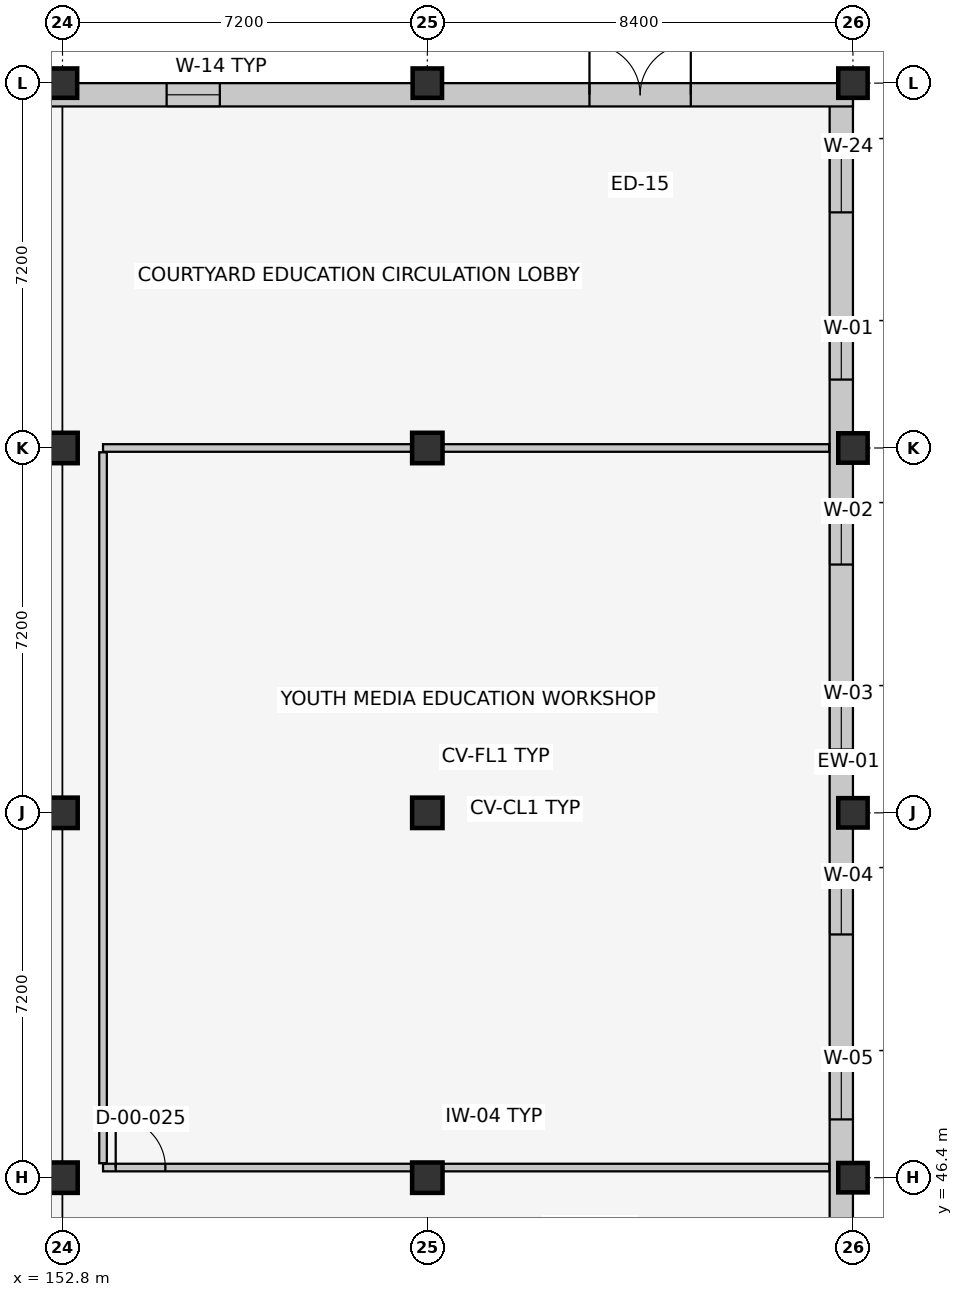
"""IFC4 building model, lengths in metres.
Left out: names, types, materials, properties, quantities, classifications, styles, units other than length and angle.
Written with IfcOpenShell. Run it as: python <this file> out.ifc"""

import sys

from ifc_helpers import new_model, si_unit, direction, frame, frame_2d, origin, origin_2d, place, context, subcontext, project, spatial, rectangle, extrude, element, fill, save


model = new_model("IFC4")
c1 = context("Model", 3, precision=1e-05, world=origin(), true_north=direction((0.0, 1.0)))
c2 = subcontext(c1, "Body", "Model", "MODEL_VIEW")
j1 = project(units=[si_unit("LENGTHUNIT", "METRE"), si_unit("PLANEANGLEUNIT", "RADIAN")], contexts=[c1])
p1 = place(None, origin())
s1 = spatial("IfcSite", under=j1, at=p1, CompositionType="ELEMENT")
p2 = place(p1, origin())
s2 = spatial("IfcBuilding", under=s1, at=p2, CompositionType="ELEMENT")
p3 = place(p2, origin())
s3 = spatial("IfcBuildingStorey", under=s2, at=p3, CompositionType="ELEMENT", Elevation=0.0)
for number, where, z_axis, x_axis in (
    (1, (152.8, 46.4, 0.0), (0.0, 0.0, 1.0), (1.0, 0.0, 0.0)),
    (2, (152.8, 53.6, 0.0), (0.0, 0.0, 1.0), (1.0, 0.0, 0.0)),
    (3, (152.8, 60.8, 0.0), (0.0, 0.0, 1.0), (1.0, 0.0, 0.0)),
):
    element("IfcColumn", number, at=place(p3, frame(where, z_axis=z_axis, x_axis=x_axis)), inside=s3, PredefinedType="COLUMN", context=c2, shape_type="SweptSolid", body=[
        extrude(rectangle(XDim=0.6, YDim=0.6, at=origin_2d()), origin(), (0.0, 0.0, 1.0), 5.4),
    ])
p4 = place(p3, frame((152.8, 68.0, 0.0), z_axis=(0.0, 0.0, 1.0), x_axis=(1.0, 0.0, 0.0)))
e4 = element("IfcColumn", 4, at=p4, inside=s3, PredefinedType="COLUMN", context=c2, shape_type="SweptSolid", body=[
    extrude(rectangle(XDim=0.58, YDim=0.58, at=origin_2d()), origin(), (0.0, 0.0, 1.0), 5.4),
])
for number, where, z_axis, x_axis in (
    (5, (160.0, 46.4, 0.0), (0.0, 0.0, 1.0), (1.0, 0.0, 0.0)),
    (6, (160.0, 53.6, 0.0), (0.0, 0.0, 1.0), (1.0, 0.0, 0.0)),
    (7, (160.0, 60.8, 0.0), (0.0, 0.0, 1.0), (1.0, 0.0, 0.0)),
):
    element("IfcColumn", number, at=place(p3, frame(where, z_axis=z_axis, x_axis=x_axis)), inside=s3, PredefinedType="COLUMN", context=c2, shape_type="SweptSolid", body=[
        extrude(rectangle(XDim=0.6, YDim=0.6, at=origin_2d()), origin(), (0.0, 0.0, 1.0), 5.4),
    ])
for number, where, z_axis, x_axis in (
    (8, (160.0, 68.0, 0.0), (0.0, 0.0, 1.0), (1.0, 0.0, 0.0)),
    (9, (168.4, 46.4, 0.0), (0.0, 0.0, 1.0), (1.0, 0.0, 0.0)),
    (10, (168.4, 53.6, 0.0), (0.0, 0.0, 1.0), (1.0, 0.0, 0.0)),
    (11, (168.4, 60.8, 0.0), (0.0, 0.0, 1.0), (1.0, 0.0, 0.0)),
    (12, (168.4, 68.0, 0.0), (0.0, 0.0, 1.0), (1.0, 0.0, 0.0)),
):
    element("IfcColumn", number, at=place(p3, frame(where, z_axis=z_axis, x_axis=x_axis)), inside=s3, PredefinedType="COLUMN", context=c2, shape_type="SweptSolid", body=[
        extrude(rectangle(XDim=0.58, YDim=0.58, at=origin_2d()), origin(), (0.0, 0.0, 1.0), 5.4),
    ])
p5 = place(p3, frame((168.17, 68.0, 0.0), z_axis=(0.0, 0.0, 1.0), x_axis=(0.0, -1.0, 0.0)))
e13 = element("IfcWall", 13, at=p5, inside=s3, PredefinedType="SOLIDWALL", context=c2, shape_type="SweptSolid", body=[
    extrude(rectangle(XDim=28.8, YDim=0.46, at=frame_2d((14.4, 0.0))), origin(), (0.0, 0.0, 1.0), 4.555),
])
p6 = place(p5, frame((1.05, 0.0, 0.9)))
e14 = element("IfcOpeningElement", 14, at=p6, cuts=e13, PredefinedType="OPENING", context=c2, shape_type="SweptSolid", body=[
    extrude(rectangle(XDim=1.5, YDim=1.75, at=frame_2d((0.75, 0.875))), frame((0.0, 0.242, 0.0), z_axis=(0.0, -1.0, 0.0), x_axis=(1.0, 0.0, 0.0)), (0.0, 0.0, 1.0), 0.484),
])
p7 = place(p5, frame((4.95, 0.0, 0.9)))
e15 = element("IfcOpeningElement", 15, at=p7, cuts=e13, PredefinedType="OPENING", context=c2, shape_type="SweptSolid", body=[
    extrude(rectangle(XDim=0.9, YDim=1.35, at=frame_2d((0.45, 0.675))), frame((0.0, 0.242, 0.0), z_axis=(0.0, -1.0, 0.0), x_axis=(1.0, 0.0, 0.0)), (0.0, 0.0, 1.0), 0.484),
])
p8 = place(p5, frame((8.5, 0.0, 0.9)))
e16 = element("IfcOpeningElement", 16, at=p8, cuts=e13, PredefinedType="OPENING", context=c2, shape_type="SweptSolid", body=[
    extrude(rectangle(XDim=1.0, YDim=1.35, at=frame_2d((0.5, 0.675))), frame((0.0, 0.242, 0.0), z_axis=(0.0, -1.0, 0.0), x_axis=(1.0, 0.0, 0.0)), (0.0, 0.0, 1.0), 0.484),
])
p9 = place(p5, frame((12.05, 0.0, 0.9)))
e17 = element("IfcOpeningElement", 17, at=p9, cuts=e13, PredefinedType="OPENING", context=c2, shape_type="SweptSolid", body=[
    extrude(rectangle(XDim=1.1, YDim=1.35, at=frame_2d((0.55, 0.675))), frame((0.0, 0.242, 0.0), z_axis=(0.0, -1.0, 0.0), x_axis=(1.0, 0.0, 0.0)), (0.0, 0.0, 1.0), 0.484),
])
p10 = place(p5, frame((15.6, 0.0, 0.9)))
e18 = element("IfcOpeningElement", 18, at=p10, cuts=e13, PredefinedType="OPENING", context=c2, shape_type="SweptSolid", body=[
    extrude(rectangle(XDim=1.2, YDim=1.35, at=frame_2d((0.6, 0.675))), frame((0.0, 0.242, 0.0), z_axis=(0.0, -1.0, 0.0), x_axis=(1.0, 0.0, 0.0)), (0.0, 0.0, 1.0), 0.484),
])
p11 = place(p5, frame((19.15, 0.0, 0.9)))
e19 = element("IfcOpeningElement", 19, at=p11, cuts=e13, PredefinedType="OPENING", context=c2, shape_type="SweptSolid", body=[
    extrude(rectangle(XDim=1.3, YDim=1.35, at=frame_2d((0.65, 0.675))), frame((0.0, 0.242, 0.0), z_axis=(0.0, -1.0, 0.0), x_axis=(1.0, 0.0, 0.0)), (0.0, 0.0, 1.0), 0.484),
])
p12 = place(p5, frame((26.525, 0.0, 0.9)))
e20 = element("IfcOpeningElement", 20, at=p12, cuts=e13, PredefinedType="OPENING", context=c2, shape_type="SweptSolid", body=[
    extrude(rectangle(XDim=0.95, YDim=1.45, at=frame_2d((0.475, 0.725))), frame((0.0, 0.242, 0.0), z_axis=(0.0, -1.0, 0.0), x_axis=(1.0, 0.0, 0.0)), (0.0, 0.0, 1.0), 0.484),
])
p13 = place(p3, frame((131.2, 67.77, 0.0), z_axis=(0.0, 0.0, 1.0), x_axis=(1.0, 0.0, 0.0)))
e21 = element("IfcWall", 21, at=p13, inside=s3, PredefinedType="SOLIDWALL", context=c2, shape_type="SweptSolid", body=[
    extrude(rectangle(XDim=37.2, YDim=0.46, at=frame_2d((18.6, 0.0))), origin(), (0.0, 0.0, 1.0), 4.315),
])
p14 = place(p13, frame((32.0, 0.0, 0.0)))
e22 = element("IfcOpeningElement", 22, at=p14, cuts=e21, PredefinedType="OPENING", context=c2, shape_type="SweptSolid", body=[
    extrude(rectangle(XDim=2.0, YDim=2.35, at=frame_2d((1.0, 1.175))), frame((0.0, 0.242, 0.0), z_axis=(0.0, -1.0, 0.0), x_axis=(1.0, 0.0, 0.0)), (0.0, 0.0, 1.0), 0.484),
])
p15 = place(p13, frame((1.335, 0.0, 0.9)))
e23 = element("IfcOpeningElement", 23, at=p15, cuts=e21, PredefinedType="OPENING", context=c2, shape_type="SweptSolid", body=[
    extrude(rectangle(XDim=1.05, YDim=1.45, at=frame_2d((0.525, 0.725))), frame((0.0, 0.242, 0.0), z_axis=(0.0, -1.0, 0.0), x_axis=(1.0, 0.0, 0.0)), (0.0, 0.0, 1.0), 0.484),
])
p16 = place(p13, frame((5.005, 0.0, 0.9)))
e24 = element("IfcOpeningElement", 24, at=p16, cuts=e21, PredefinedType="OPENING", context=c2, shape_type="SweptSolid", body=[
    extrude(rectangle(XDim=1.15, YDim=1.45, at=frame_2d((0.575, 0.725))), frame((0.0, 0.242, 0.0), z_axis=(0.0, -1.0, 0.0), x_axis=(1.0, 0.0, 0.0)), (0.0, 0.0, 1.0), 0.484),
])
p17 = place(p13, frame((8.675, 0.0, 0.9)))
e25 = element("IfcOpeningElement", 25, at=p17, cuts=e21, PredefinedType="OPENING", context=c2, shape_type="SweptSolid", body=[
    extrude(rectangle(XDim=1.25, YDim=1.45, at=frame_2d((0.625, 0.725))), frame((0.0, 0.242, 0.0), z_axis=(0.0, -1.0, 0.0), x_axis=(1.0, 0.0, 0.0)), (0.0, 0.0, 1.0), 0.484),
])
p18 = place(p13, frame((16.015, 0.0, 0.9)))
e26 = element("IfcOpeningElement", 26, at=p18, cuts=e21, PredefinedType="OPENING", context=c2, shape_type="SweptSolid", body=[
    extrude(rectangle(XDim=1.45, YDim=1.45, at=frame_2d((0.725, 0.725))), frame((0.0, 0.242, 0.0), z_axis=(0.0, -1.0, 0.0), x_axis=(1.0, 0.0, 0.0)), (0.0, 0.0, 1.0), 0.484),
])
p19 = place(p13, frame((23.655, 0.0, 0.9)))
e27 = element("IfcOpeningElement", 27, at=p19, cuts=e21, PredefinedType="OPENING", context=c2, shape_type="SweptSolid", body=[
    extrude(rectangle(XDim=1.05, YDim=1.6, at=frame_2d((0.525, 0.8))), frame((0.0, 0.242, 0.0), z_axis=(0.0, -1.0, 0.0), x_axis=(1.0, 0.0, 0.0)), (0.0, 0.0, 1.0), 0.484),
])
p20 = place(p3, frame((153.6, 46.6, 0.0), z_axis=(0.0, 0.0, 1.0), x_axis=(1.0, 0.0, 0.0)))
e28 = element("IfcWall", 28, at=p20, inside=s3, PredefinedType="PARTITIONING", context=c2, shape_type="SweptSolid", body=[
    extrude(rectangle(XDim=14.33, YDim=0.15, at=frame_2d((7.165, 0.0))), origin(), (0.0, 0.0, 1.0), 4.185),
])
p21 = place(p20, frame((0.25, 0.0, 0.0)))
e29 = element("IfcOpeningElement", 29, at=p21, cuts=e28, PredefinedType="OPENING", context=c2, shape_type="SweptSolid", body=[
    extrude(rectangle(XDim=0.98, YDim=2.12, at=frame_2d((0.49, 1.06))), frame((0.0, 0.087, 0.0), z_axis=(0.0, -1.0, 0.0), x_axis=(1.0, 0.0, 0.0)), (0.0, 0.0, 1.0), 0.174),
])
p22 = place(p3, frame((153.6, 60.8, 0.0), z_axis=(0.0, 0.0, 1.0), x_axis=(1.0, 0.0, 0.0)))
e30 = element("IfcWall", 30, at=p22, inside=s3, PredefinedType="PARTITIONING", context=c2, shape_type="SweptSolid", body=[
    extrude(rectangle(XDim=14.33, YDim=0.15, at=frame_2d((7.165, 0.0))), origin(), (0.0, 0.0, 1.0), 4.185),
])
p23 = place(p3, frame((153.6, 46.685, 0.0), z_axis=(0.0, 0.0, 1.0), x_axis=(0.0, 1.0, 0.0)))
e31 = element("IfcWall", 31, at=p23, inside=s3, PredefinedType="PARTITIONING", context=c2, shape_type="SweptSolid", body=[
    extrude(rectangle(XDim=14.03, YDim=0.15, at=frame_2d((7.015, 0.0))), origin(), (0.0, 0.0, 1.0), 5.16),
])
p24 = place(p6, origin())
e32 = element("IfcWindow", 32, at=p24, inside=s3, PartitioningType="SINGLE_PANEL", PredefinedType="WINDOW", context=c2, shape_type="SweptSolid", body=[
    extrude(rectangle(XDim=1.5, YDim=1.75, at=frame_2d((0.75, 0.875))), frame((0.0, 0.03, 0.0), z_axis=(0.0, -1.0, 0.0), x_axis=(1.0, 0.0, 0.0)), (0.0, 0.0, 1.0), 0.06),
])
fill(e14, e32)
p25 = place(p7, origin())
e33 = element("IfcWindow", 33, at=p25, inside=s3, PartitioningType="SINGLE_PANEL", PredefinedType="WINDOW", context=c2, shape_type="SweptSolid", body=[
    extrude(rectangle(XDim=0.9, YDim=1.35, at=frame_2d((0.45, 0.675))), frame((0.0, 0.03, 0.0), z_axis=(0.0, -1.0, 0.0), x_axis=(1.0, 0.0, 0.0)), (0.0, 0.0, 1.0), 0.06),
])
fill(e15, e33)
p26 = place(p8, origin())
e34 = element("IfcWindow", 34, at=p26, inside=s3, PartitioningType="SINGLE_PANEL", PredefinedType="WINDOW", context=c2, shape_type="SweptSolid", body=[
    extrude(rectangle(XDim=1.0, YDim=1.35, at=frame_2d((0.5, 0.675))), frame((0.0, 0.03, 0.0), z_axis=(0.0, -1.0, 0.0), x_axis=(1.0, 0.0, 0.0)), (0.0, 0.0, 1.0), 0.06),
])
fill(e16, e34)
p27 = place(p9, origin())
e35 = element("IfcWindow", 35, at=p27, inside=s3, PartitioningType="SINGLE_PANEL", PredefinedType="WINDOW", context=c2, shape_type="SweptSolid", body=[
    extrude(rectangle(XDim=1.1, YDim=1.35, at=frame_2d((0.55, 0.675))), frame((0.0, 0.03, 0.0), z_axis=(0.0, -1.0, 0.0), x_axis=(1.0, 0.0, 0.0)), (0.0, 0.0, 1.0), 0.06),
])
fill(e17, e35)
p28 = place(p10, origin())
e36 = element("IfcWindow", 36, at=p28, inside=s3, PartitioningType="SINGLE_PANEL", PredefinedType="WINDOW", context=c2, shape_type="SweptSolid", body=[
    extrude(rectangle(XDim=1.2, YDim=1.35, at=frame_2d((0.6, 0.675))), frame((0.0, 0.03, 0.0), z_axis=(0.0, -1.0, 0.0), x_axis=(1.0, 0.0, 0.0)), (0.0, 0.0, 1.0), 0.06),
])
fill(e18, e36)
p29 = place(p11, origin())
e37 = element("IfcWindow", 37, at=p29, inside=s3, PartitioningType="SINGLE_PANEL", PredefinedType="WINDOW", context=c2, shape_type="SweptSolid", body=[
    extrude(rectangle(XDim=1.3, YDim=1.35, at=frame_2d((0.65, 0.675))), frame((0.0, 0.03, 0.0), z_axis=(0.0, -1.0, 0.0), x_axis=(1.0, 0.0, 0.0)), (0.0, 0.0, 1.0), 0.06),
])
fill(e19, e37)
p30 = place(p14, origin())
e38 = element("IfcDoor", 38, at=p30, inside=s3, OperationType="DOUBLE_DOOR_SINGLE_SWING", PredefinedType="DOOR", context=c2, shape_type="SweptSolid", body=[
    extrude(rectangle(XDim=2.0, YDim=2.35, at=frame_2d((1.0, 1.175))), frame((0.0, 0.025, 0.0), z_axis=(0.0, -1.0, 0.0), x_axis=(1.0, 0.0, 0.0)), (0.0, 0.0, 1.0), 0.05),
])
fill(e22, e38)
p31 = place(p19, origin())
e39 = element("IfcWindow", 39, at=p31, inside=s3, PartitioningType="SINGLE_PANEL", PredefinedType="WINDOW", context=c2, shape_type="SweptSolid", body=[
    extrude(rectangle(XDim=1.05, YDim=1.6, at=frame_2d((0.525, 0.8))), frame((0.0, 0.03, 0.0), z_axis=(0.0, -1.0, 0.0), x_axis=(1.0, 0.0, 0.0)), (0.0, 0.0, 1.0), 0.06),
])
fill(e27, e39)
p32 = place(p21, origin())
e40 = element("IfcDoor", 40, at=p32, inside=s3, OperationType="SINGLE_SWING_LEFT", PredefinedType="DOOR", context=c2, shape_type="SweptSolid", body=[
    extrude(rectangle(XDim=0.98, YDim=2.12, at=frame_2d((0.49, 1.06))), frame((0.0, 0.025, 0.0), z_axis=(0.0, -1.0, 0.0), x_axis=(1.0, 0.0, 0.0)), (0.0, 0.0, 1.0), 0.05),
])
fill(e29, e40)
save(model, sys.argv[1])
